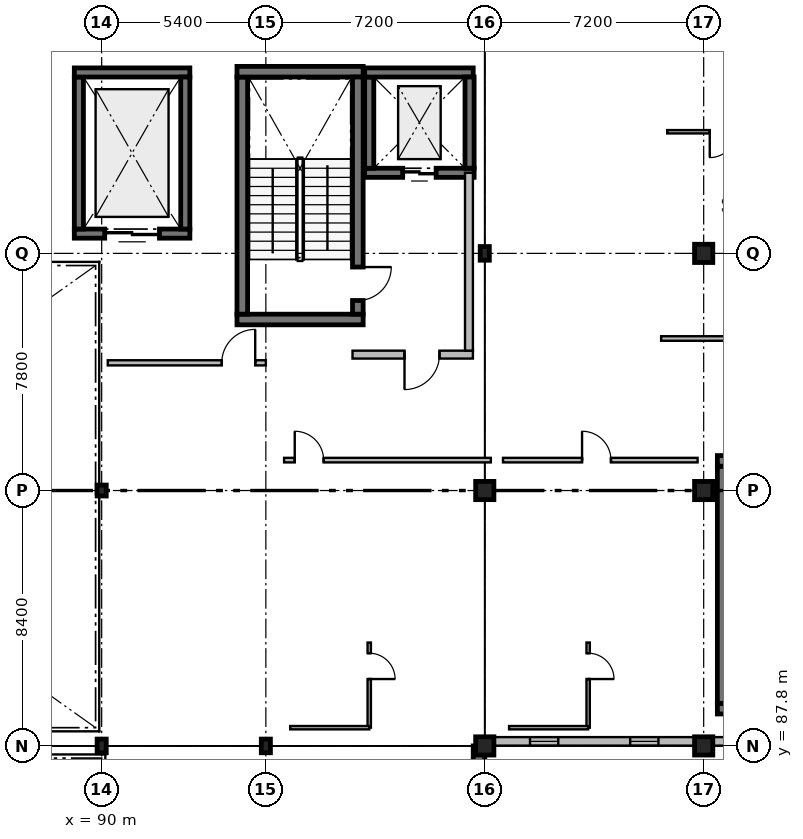
"""IFC4 building model, lengths in metres.
Left out: names, types, materials, properties, quantities, classifications, styles, units other than length and angle.
Written with IfcOpenShell. Run it as: python <this file> out.ifc"""

import sys

from ifc_helpers import new_model, si_unit, direction, frame, frame_2d, origin, origin_2d, place, context, subcontext, project, spatial, rectangle, i_section, extrude, element, fill, save


model = new_model("IFC4")
c1 = context("Model", 3, precision=1e-05, world=origin(), true_north=direction((0.0, 1.0)))
c2 = subcontext(c1, "Body", "Model", "MODEL_VIEW")
j1 = project(units=[si_unit("LENGTHUNIT", "METRE"), si_unit("PLANEANGLEUNIT", "RADIAN")], contexts=[c1])
p1 = place(None, origin())
s1 = spatial("IfcSite", under=j1, at=p1, CompositionType="ELEMENT")
p2 = place(p1, origin())
s2 = spatial("IfcBuilding", under=s1, at=p2, CompositionType="ELEMENT")
p3 = place(p2, frame((0.0, 0.0, 4.8)))
s3 = spatial("IfcBuildingStorey", under=s2, at=p3, CompositionType="ELEMENT", Elevation=4.8)
p4 = place(p3, frame((90.0, 87.8, 0.0), z_axis=(0.0, 0.0, 1.0), x_axis=(1.0, 0.0, 0.0)))
e1 = element("IfcColumn", 1, at=p4, inside=s3, PredefinedType="COLUMN", context=c2, shape_type="SweptSolid", body=[
    extrude(i_section(OverallWidth=0.3, OverallDepth=0.45, WebThickness=0.014, FlangeThickness=0.026, FilletRadius=0.027, at=origin_2d()), origin(), (0.0, 0.0, 1.0), 4.2),
])
p5 = place(p3, frame((90.0, 96.2, 0.0), z_axis=(0.0, 0.0, 1.0), x_axis=(1.0, 0.0, 0.0)))
e2 = element("IfcColumn", 2, at=p5, inside=s3, PredefinedType="COLUMN", context=c2, shape_type="SweptSolid", body=[
    extrude(i_section(OverallWidth=0.3, OverallDepth=0.36, WebThickness=0.012, FlangeThickness=0.022, FilletRadius=0.027, at=origin_2d()), origin(), (0.0, 0.0, 1.0), 4.2),
])
p6 = place(p3, frame((95.4, 87.8, 0.0), z_axis=(0.0, 0.0, 1.0), x_axis=(1.0, 0.0, 0.0)))
e3 = element("IfcColumn", 3, at=p6, inside=s3, PredefinedType="COLUMN", context=c2, shape_type="SweptSolid", body=[
    extrude(i_section(OverallWidth=0.3, OverallDepth=0.45, WebThickness=0.014, FlangeThickness=0.026, FilletRadius=0.027, at=origin_2d()), origin(), (0.0, 0.0, 1.0), 4.2),
])
for number, where, z_axis, x_axis in (
    (4, (102.6, 87.8, 0.0), (0.0, 0.0, 1.0), (1.0, 0.0, 0.0)),
    (5, (102.6, 96.2, 0.0), (0.0, 0.0, 1.0), (1.0, 0.0, 0.0)),
):
    element("IfcColumn", number, at=place(p3, frame(where, z_axis=z_axis, x_axis=x_axis)), inside=s3, PredefinedType="COLUMN", context=c2, shape_type="SweptSolid", body=[
        extrude(rectangle(XDim=0.6, YDim=0.6, at=origin_2d()), origin(), (0.0, 0.0, 1.0), 4.2),
    ])
p7 = place(p3, frame((102.6, 104.0, 0.0), z_axis=(0.0, 0.0, 1.0), x_axis=(1.0, 0.0, 0.0)))
e6 = element("IfcColumn", 6, at=p7, inside=s3, PredefinedType="COLUMN", context=c2, shape_type="SweptSolid", body=[
    extrude(i_section(OverallWidth=0.3, OverallDepth=0.45, WebThickness=0.014, FlangeThickness=0.026, FilletRadius=0.027, at=origin_2d()), origin(), (0.0, 0.0, 1.0), 4.2),
])
for number, where, z_axis, x_axis in (
    (7, (109.8, 87.8, 0.0), (0.0, 0.0, 1.0), (1.0, 0.0, 0.0)),
    (8, (109.8, 96.2, 0.0), (0.0, 0.0, 1.0), (1.0, 0.0, 0.0)),
    (9, (109.8, 104.0, 0.0), (0.0, 0.0, 1.0), (1.0, 0.0, 0.0)),
):
    element("IfcColumn", number, at=place(p3, frame(where, z_axis=z_axis, x_axis=x_axis)), inside=s3, PredefinedType="COLUMN", context=c2, shape_type="SweptSolid", body=[
        extrude(rectangle(XDim=0.6, YDim=0.6, at=origin_2d()), origin(), (0.0, 0.0, 1.0), 4.2),
    ])
p8 = place(p3, frame((98.6, 101.825, 0.0), z_axis=(0.0, 0.0, 1.0), x_axis=(-1.0, 0.0, 0.0)))
e10 = element("IfcWall", 10, at=p8, inside=s3, PredefinedType="SOLIDWALL", context=c2, shape_type="SweptSolid", body=[
    extrude(rectangle(XDim=4.15, YDim=0.35, at=frame_2d((2.075, 0.0))), origin(), (0.0, 0.0, 1.0), 4.2),
])
p9 = place(p3, frame((94.625, 102.0, 0.0), z_axis=(0.0, 0.0, 1.0), x_axis=(0.0, 1.0, 0.0)))
e11 = element("IfcWall", 11, at=p9, inside=s3, PredefinedType="SOLIDWALL", context=c2, shape_type="SweptSolid", body=[
    extrude(rectangle(XDim=7.8, YDim=0.35, at=frame_2d((3.9, 0.0))), origin(), (0.0, 0.0, 1.0), 4.2),
])
p10 = place(p3, frame((94.45, 109.975, 0.0), z_axis=(0.0, 0.0, 1.0), x_axis=(1.0, 0.0, 0.0)))
e12 = element("IfcWall", 12, at=p10, inside=s3, PredefinedType="SOLIDWALL", context=c2, shape_type="SweptSolid", body=[
    extrude(rectangle(XDim=4.15, YDim=0.35, at=frame_2d((2.075, 0.0))), origin(), (0.0, 0.0, 1.0), 4.2),
])
p11 = place(p3, frame((98.425, 109.8, 0.0), z_axis=(0.0, 0.0, 1.0), x_axis=(0.0, -1.0, 0.0)))
e13 = element("IfcWall", 13, at=p11, inside=s3, PredefinedType="SOLIDWALL", context=c2, shape_type="SweptSolid", body=[
    extrude(rectangle(XDim=7.8, YDim=0.35, at=frame_2d((3.9, 0.0))), origin(), (0.0, 0.0, 1.0), 4.2),
])
p12 = place(p11, frame((6.25, 0.0, 0.0)))
e14 = element("IfcOpeningElement", 14, at=p12, cuts=e13, PredefinedType="OPENING", context=c2, shape_type="SweptSolid", body=[
    extrude(rectangle(XDim=1.1, YDim=2.15, at=frame_2d((0.55, 1.075))), frame((0.0, 0.195, 0.0), z_axis=(0.0, -1.0, 0.0), x_axis=(1.0, 0.0, 0.0)), (0.0, 0.0, 1.0), 0.39),
])
p13 = place(p3, frame((102.25, 106.65, 0.0), z_axis=(0.0, 0.0, 1.0), x_axis=(-1.0, 0.0, 0.0)))
e15 = element("IfcWall", 15, at=p13, inside=s3, PredefinedType="SOLIDWALL", context=c2, shape_type="SweptSolid", body=[
    extrude(rectangle(XDim=3.6, YDim=0.3, at=frame_2d((1.8, 0.0))), origin(), (0.0, 0.0, 1.0), 4.2),
])
p14 = place(p13, frame((1.25, 0.0, 0.0)))
e16 = element("IfcOpeningElement", 16, at=p14, cuts=e15, PredefinedType="OPENING", context=c2, shape_type="SweptSolid", body=[
    extrude(rectangle(XDim=1.1, YDim=2.1, at=frame_2d((0.55, 1.05))), frame((0.0, 0.17, 0.0), z_axis=(0.0, -1.0, 0.0), x_axis=(1.0, 0.0, 0.0)), (0.0, 0.0, 1.0), 0.34),
])
p15 = place(p3, frame((98.8, 106.8, 0.0), z_axis=(0.0, 0.0, 1.0), x_axis=(0.0, 1.0, 0.0)))
e17 = element("IfcWall", 17, at=p15, inside=s3, PredefinedType="SOLIDWALL", context=c2, shape_type="SweptSolid", body=[
    extrude(rectangle(XDim=3.0, YDim=0.3, at=frame_2d((1.5, 0.0))), origin(), (0.0, 0.0, 1.0), 4.2),
])
p16 = place(p3, frame((98.65, 109.95, 0.0), z_axis=(0.0, 0.0, 1.0), x_axis=(1.0, 0.0, 0.0)))
e18 = element("IfcWall", 18, at=p16, inside=s3, PredefinedType="SOLIDWALL", context=c2, shape_type="SweptSolid", body=[
    extrude(rectangle(XDim=3.57, YDim=0.3, at=frame_2d((1.785, 0.0))), origin(), (0.0, 0.0, 1.0), 4.2),
])
p17 = place(p3, frame((102.1, 109.8, 0.0), z_axis=(0.0, 0.0, 1.0), x_axis=(0.0, -1.0, 0.0)))
e19 = element("IfcWall", 19, at=p17, inside=s3, PredefinedType="SOLIDWALL", context=c2, shape_type="SweptSolid", body=[
    extrude(rectangle(XDim=3.0, YDim=0.3, at=frame_2d((1.5, 0.0))), origin(), (0.0, 0.0, 1.0), 4.2),
])
p18 = place(p3, frame((102.21, 100.67, 0.0), z_axis=(0.0, 0.0, 1.0), x_axis=(-1.0, 0.0, 0.0)))
e20 = element("IfcWall", 20, at=p18, inside=s3, PredefinedType="SOLIDWALL", context=c2, shape_type="SweptSolid", body=[
    extrude(rectangle(XDim=3.96, YDim=0.26, at=frame_2d((1.98, 0.0))), origin(), (0.0, 0.0, 1.0), 3.94),
])
p19 = place(p18, frame((1.1, 0.0, 0.0)))
e21 = element("IfcOpeningElement", 21, at=p19, cuts=e20, PredefinedType="OPENING", context=c2, shape_type="SweptSolid", body=[
    extrude(rectangle(XDim=1.15, YDim=2.2, at=frame_2d((0.575, 1.1))), frame((0.0, 0.15, 0.0), z_axis=(0.0, -1.0, 0.0), x_axis=(1.0, 0.0, 0.0)), (0.0, 0.0, 1.0), 0.3),
])
p20 = place(p3, frame((102.08, 106.65, 0.0), z_axis=(0.0, 0.0, 1.0), x_axis=(0.0, -1.0, 0.0)))
e22 = element("IfcWall", 22, at=p20, inside=s3, PredefinedType="SOLIDWALL", context=c2, shape_type="SweptSolid", body=[
    extrude(rectangle(XDim=5.85, YDim=0.26, at=frame_2d((2.925, 0.0))), origin(), (0.0, 0.0, 1.0), 3.94),
])
p21 = place(p3, frame((114.4, 89.025, 0.0), z_axis=(0.0, 0.0, 1.0), x_axis=(-1.0, 0.0, 0.0)))
e23 = element("IfcWall", 23, at=p21, inside=s3, PredefinedType="SOLIDWALL", context=c2, shape_type="SweptSolid", body=[
    extrude(rectangle(XDim=4.15, YDim=0.35, at=frame_2d((2.075, 0.0))), origin(), (0.0, 0.0, 1.0), 4.2),
])
p22 = place(p3, frame((110.425, 89.2, 0.0), z_axis=(0.0, 0.0, 1.0), x_axis=(0.0, 1.0, 0.0)))
e24 = element("IfcWall", 24, at=p22, inside=s3, PredefinedType="SOLIDWALL", context=c2, shape_type="SweptSolid", body=[
    extrude(rectangle(XDim=7.8, YDim=0.35, at=frame_2d((3.9, 0.0))), origin(), (0.0, 0.0, 1.0), 4.2),
])
p23 = place(p3, frame((110.25, 97.175, 0.0), z_axis=(0.0, 0.0, 1.0), x_axis=(1.0, 0.0, 0.0)))
e25 = element("IfcWall", 25, at=p23, inside=s3, PredefinedType="SOLIDWALL", context=c2, shape_type="SweptSolid", body=[
    extrude(rectangle(XDim=4.15, YDim=0.35, at=frame_2d((2.075, 0.0))), origin(), (0.0, 0.0, 1.0), 4.2),
])
p24 = place(p23, frame((1.525, 0.0, 0.0)))
e26 = element("IfcOpeningElement", 26, at=p24, cuts=e25, PredefinedType="OPENING", context=c2, shape_type="SweptSolid", body=[
    extrude(rectangle(XDim=1.1, YDim=2.15, at=frame_2d((0.55, 1.075))), frame((0.0, 0.195, 0.0), z_axis=(0.0, -1.0, 0.0), x_axis=(1.0, 0.0, 0.0)), (0.0, 0.0, 1.0), 0.39),
])
p25 = place(p3, frame((92.9, 104.65, 0.0), z_axis=(0.0, 0.0, 1.0), x_axis=(-1.0, 0.0, 0.0)))
e27 = element("IfcWall", 27, at=p25, inside=s3, PredefinedType="SOLIDWALL", context=c2, shape_type="SweptSolid", body=[
    extrude(rectangle(XDim=3.8, YDim=0.3, at=frame_2d((1.9, 0.0))), origin(), (0.0, 0.0, 1.0), 4.2),
])
p26 = place(p25, frame((1.0, 0.0, 0.0)))
e28 = element("IfcOpeningElement", 28, at=p26, cuts=e27, PredefinedType="OPENING", context=c2, shape_type="SweptSolid", body=[
    extrude(rectangle(XDim=1.8, YDim=2.4, at=frame_2d((0.9, 1.2))), frame((0.0, 0.17, 0.0), z_axis=(0.0, -1.0, 0.0), x_axis=(1.0, 0.0, 0.0)), (0.0, 0.0, 1.0), 0.34),
])
p27 = place(p3, frame((89.25, 104.8, 0.0), z_axis=(0.0, 0.0, 1.0), x_axis=(0.0, 1.0, 0.0)))
e29 = element("IfcWall", 29, at=p27, inside=s3, PredefinedType="SOLIDWALL", context=c2, shape_type="SweptSolid", body=[
    extrude(rectangle(XDim=5.0, YDim=0.3, at=frame_2d((2.5, 0.0))), origin(), (0.0, 0.0, 1.0), 4.2),
])
p28 = place(p3, frame((89.1, 109.95, 0.0), z_axis=(0.0, 0.0, 1.0), x_axis=(1.0, 0.0, 0.0)))
e30 = element("IfcWall", 30, at=p28, inside=s3, PredefinedType="SOLIDWALL", context=c2, shape_type="SweptSolid", body=[
    extrude(rectangle(XDim=3.8, YDim=0.3, at=frame_2d((1.9, 0.0))), origin(), (0.0, 0.0, 1.0), 4.2),
])
p29 = place(p3, frame((92.75, 109.8, 0.0), z_axis=(0.0, 0.0, 1.0), x_axis=(0.0, -1.0, 0.0)))
e31 = element("IfcWall", 31, at=p29, inside=s3, PredefinedType="SOLIDWALL", context=c2, shape_type="SweptSolid", body=[
    extrude(rectangle(XDim=5.0, YDim=0.3, at=frame_2d((2.5, 0.0))), origin(), (0.0, 0.0, 1.0), 4.2),
])
p30 = place(p3, frame((102.41, 87.8, 0.0), z_axis=(0.0, 0.0, 1.0), x_axis=(0.0, -1.0, 0.0)))
e32 = element("IfcWall", 32, at=p30, inside=s3, PredefinedType="SOLIDWALL", context=c2, shape_type="SweptSolid", body=[
    extrude(rectangle(XDim=36.0, YDim=0.38, at=frame_2d((18.0, 0.0))), origin(), (0.0, 0.0, 1.0), 3.94),
])
p31 = place(p3, frame((102.905, 87.95, 0.0), z_axis=(0.0, 0.0, 1.0), x_axis=(1.0, 0.0, 0.0)))
e33 = element("IfcWall", 33, at=p31, inside=s3, PredefinedType="SOLIDWALL", context=c2, shape_type="SweptSolid", body=[
    extrude(rectangle(XDim=6.59, YDim=0.28, at=frame_2d((3.295, 0.0))), origin(), (0.0, 0.0, 1.0), 3.273),
])
p32 = place(p31, frame((1.183, 0.0, 0.95)))
e34 = element("IfcOpeningElement", 34, at=p32, cuts=e33, PredefinedType="OPENING", context=c2, shape_type="SweptSolid", body=[
    extrude(rectangle(XDim=0.93, YDim=1.8, at=frame_2d((0.465, 0.9))), frame((0.0, 0.16, 0.0), z_axis=(0.0, -1.0, 0.0), x_axis=(1.0, 0.0, 0.0)), (0.0, 0.0, 1.0), 0.32),
])
p33 = place(p31, frame((4.478, 0.0, 0.95)))
e35 = element("IfcOpeningElement", 35, at=p33, cuts=e33, PredefinedType="OPENING", context=c2, shape_type="SweptSolid", body=[
    extrude(rectangle(XDim=0.93, YDim=1.8, at=frame_2d((0.465, 0.9))), frame((0.0, 0.16, 0.0), z_axis=(0.0, -1.0, 0.0), x_axis=(1.0, 0.0, 0.0)), (0.0, 0.0, 1.0), 0.32),
])
p34 = place(p3, frame((110.105, 87.95, 0.0), z_axis=(0.0, 0.0, 1.0), x_axis=(1.0, 0.0, 0.0)))
e36 = element("IfcWall", 36, at=p34, inside=s3, PredefinedType="SOLIDWALL", context=c2, shape_type="SweptSolid", body=[
    extrude(rectangle(XDim=6.59, YDim=0.28, at=frame_2d((3.295, 0.0))), origin(), (0.0, 0.0, 1.0), 3.273),
])
p35 = place(p34, frame((1.153, 0.0, 0.95)))
e37 = element("IfcOpeningElement", 37, at=p35, cuts=e36, PredefinedType="OPENING", context=c2, shape_type="SweptSolid", body=[
    extrude(rectangle(XDim=0.99, YDim=1.8, at=frame_2d((0.495, 0.9))), frame((0.0, 0.16, 0.0), z_axis=(0.0, -1.0, 0.0), x_axis=(1.0, 0.0, 0.0)), (0.0, 0.0, 1.0), 0.32),
])
p36 = place(p34, frame((4.448, 0.0, 0.95)))
e38 = element("IfcOpeningElement", 38, at=p36, cuts=e36, PredefinedType="OPENING", context=c2, shape_type="SweptSolid", body=[
    extrude(rectangle(XDim=0.99, YDim=1.8, at=frame_2d((0.495, 0.9))), frame((0.0, 0.16, 0.0), z_axis=(0.0, -1.0, 0.0), x_axis=(1.0, 0.0, 0.0)), (0.0, 0.0, 1.0), 0.32),
])
p37 = place(p3, frame((98.8, 91.2, 0.0), z_axis=(0.0, 0.0, 1.0), x_axis=(0.0, -1.0, 0.0)))
e39 = element("IfcWall", 39, at=p37, inside=s3, PredefinedType="PARTITIONING", context=c2, shape_type="SweptSolid", body=[
    extrude(rectangle(XDim=2.8, YDim=0.11, at=frame_2d((1.4, 0.0))), origin(), (0.0, 0.0, 1.0), 3.94),
])
p38 = place(p37, frame((0.35, 0.0, 0.0)))
e40 = element("IfcOpeningElement", 40, at=p38, cuts=e39, PredefinedType="OPENING", context=c2, shape_type="SweptSolid", body=[
    extrude(rectangle(XDim=0.85, YDim=2.1, at=frame_2d((0.425, 1.05))), frame((0.0, 0.075, 0.0), z_axis=(0.0, -1.0, 0.0), x_axis=(1.0, 0.0, 0.0)), (0.0, 0.0, 1.0), 0.15),
])
p39 = place(p3, frame((98.8, 88.4, 0.0), z_axis=(0.0, 0.0, 1.0), x_axis=(-1.0, 0.0, 0.0)))
e41 = element("IfcWall", 41, at=p39, inside=s3, PredefinedType="PARTITIONING", context=c2, shape_type="SweptSolid", body=[
    extrude(rectangle(XDim=2.6, YDim=0.11, at=frame_2d((1.3, 0.0))), origin(), (0.0, 0.0, 1.0), 3.94),
])
p40 = place(p3, frame((96.0, 97.2, 0.0), z_axis=(0.0, 0.0, 1.0), x_axis=(1.0, 0.0, 0.0)))
e42 = element("IfcWall", 42, at=p40, inside=s3, PredefinedType="PARTITIONING", context=c2, shape_type="SweptSolid", body=[
    extrude(rectangle(XDim=6.8, YDim=0.15, at=frame_2d((3.4, 0.0))), origin(), (0.0, 0.0, 1.0), 3.94),
])
p41 = place(p40, frame((0.35, 0.0, 0.0)))
e43 = element("IfcOpeningElement", 43, at=p41, cuts=e42, PredefinedType="OPENING", context=c2, shape_type="SweptSolid", body=[
    extrude(rectangle(XDim=0.95, YDim=2.2, at=frame_2d((0.475, 1.1))), frame((0.0, 0.095, 0.0), z_axis=(0.0, -1.0, 0.0), x_axis=(1.0, 0.0, 0.0)), (0.0, 0.0, 1.0), 0.19),
])
p42 = place(p3, frame((106.0, 91.2, 0.0), z_axis=(0.0, 0.0, 1.0), x_axis=(0.0, -1.0, 0.0)))
e44 = element("IfcWall", 44, at=p42, inside=s3, PredefinedType="PARTITIONING", context=c2, shape_type="SweptSolid", body=[
    extrude(rectangle(XDim=2.8, YDim=0.11, at=frame_2d((1.4, 0.0))), origin(), (0.0, 0.0, 1.0), 3.94),
])
p43 = place(p42, frame((0.35, 0.0, 0.0)))
e45 = element("IfcOpeningElement", 45, at=p43, cuts=e44, PredefinedType="OPENING", context=c2, shape_type="SweptSolid", body=[
    extrude(rectangle(XDim=0.85, YDim=2.1, at=frame_2d((0.425, 1.05))), frame((0.0, 0.075, 0.0), z_axis=(0.0, -1.0, 0.0), x_axis=(1.0, 0.0, 0.0)), (0.0, 0.0, 1.0), 0.15),
])
p44 = place(p3, frame((106.0, 88.4, 0.0), z_axis=(0.0, 0.0, 1.0), x_axis=(-1.0, 0.0, 0.0)))
e46 = element("IfcWall", 46, at=p44, inside=s3, PredefinedType="PARTITIONING", context=c2, shape_type="SweptSolid", body=[
    extrude(rectangle(XDim=2.6, YDim=0.11, at=frame_2d((1.3, 0.0))), origin(), (0.0, 0.0, 1.0), 3.94),
])
p45 = place(p3, frame((103.2, 97.2, 0.0), z_axis=(0.0, 0.0, 1.0), x_axis=(1.0, 0.0, 0.0)))
e47 = element("IfcWall", 47, at=p45, inside=s3, PredefinedType="PARTITIONING", context=c2, shape_type="SweptSolid", body=[
    extrude(rectangle(XDim=6.4, YDim=0.15, at=frame_2d((3.2, 0.0))), origin(), (0.0, 0.0, 1.0), 3.94),
])
p46 = place(p45, frame((2.6, 0.0, 0.0)))
e48 = element("IfcOpeningElement", 48, at=p46, cuts=e47, PredefinedType="OPENING", context=c2, shape_type="SweptSolid", body=[
    extrude(rectangle(XDim=0.95, YDim=2.2, at=frame_2d((0.475, 1.1))), frame((0.0, 0.095, 0.0), z_axis=(0.0, -1.0, 0.0), x_axis=(1.0, 0.0, 0.0)), (0.0, 0.0, 1.0), 0.19),
])
p47 = place(p3, frame((111.2, 108.0, 0.0), z_axis=(0.0, 0.0, 1.0), x_axis=(-1.0, 0.0, 0.0)))
e49 = element("IfcWall", 49, at=p47, inside=s3, PredefinedType="PARTITIONING", context=c2, shape_type="SweptSolid", body=[
    extrude(rectangle(XDim=2.6, YDim=0.11, at=frame_2d((1.3, 0.0))), origin(), (0.0, 0.0, 1.0), 3.94),
])
p48 = place(p47, frame((0.35, 0.0, 0.0)))
e50 = element("IfcOpeningElement", 50, at=p48, cuts=e49, PredefinedType="OPENING", context=c2, shape_type="SweptSolid", body=[
    extrude(rectangle(XDim=0.85, YDim=2.1, at=frame_2d((0.425, 1.05))), frame((0.0, 0.075, 0.0), z_axis=(0.0, -1.0, 0.0), x_axis=(1.0, 0.0, 0.0)), (0.0, 0.0, 1.0), 0.15),
])
p49 = place(p3, frame((117.2, 101.2, 0.0), z_axis=(0.0, 0.0, 1.0), x_axis=(-1.0, 0.0, 0.0)))
e51 = element("IfcWall", 51, at=p49, inside=s3, PredefinedType="PARTITIONING", context=c2, shape_type="SweptSolid", body=[
    extrude(rectangle(XDim=8.8, YDim=0.15, at=frame_2d((4.4, 0.0))), origin(), (0.0, 0.0, 1.0), 3.94),
])
p50 = place(p49, frame((3.309, 0.0, 0.0)))
e52 = element("IfcOpeningElement", 52, at=p50, cuts=e51, PredefinedType="OPENING", context=c2, shape_type="SweptSolid", body=[
    extrude(rectangle(XDim=0.95, YDim=2.2, at=frame_2d((0.475, 1.1))), frame((0.0, 0.095, 0.0), z_axis=(0.0, -1.0, 0.0), x_axis=(1.0, 0.0, 0.0)), (0.0, 0.0, 1.0), 0.19),
])
p51 = place(p3, frame((90.2, 100.4, 0.0), z_axis=(0.0, 0.0, 1.0), x_axis=(1.0, 0.0, 0.0)))
e53 = element("IfcWall", 53, at=p51, inside=s3, PredefinedType="PARTITIONING", context=c2, shape_type="SweptSolid", body=[
    extrude(rectangle(XDim=5.2, YDim=0.17, at=frame_2d((2.6, 0.0))), origin(), (0.0, 0.0, 1.0), 3.94),
])
p52 = place(p51, frame((3.75, 0.0, 0.0)))
e54 = element("IfcOpeningElement", 54, at=p52, cuts=e53, PredefinedType="OPENING", context=c2, shape_type="SweptSolid", body=[
    extrude(rectangle(XDim=1.1, YDim=2.1, at=frame_2d((0.55, 1.05))), frame((0.0, 0.105, 0.0), z_axis=(0.0, -1.0, 0.0), x_axis=(1.0, 0.0, 0.0)), (0.0, 0.0, 1.0), 0.21),
])
p53 = place(p12, origin())
e55 = element("IfcDoor", 55, at=p53, inside=s3, OperationType="SINGLE_SWING_LEFT", PredefinedType="DOOR", context=c2, shape_type="SweptSolid", body=[
    extrude(rectangle(XDim=1.1, YDim=2.15, at=frame_2d((0.55, 1.075))), frame((0.0, 0.025, 0.0), z_axis=(0.0, -1.0, 0.0), x_axis=(1.0, 0.0, 0.0)), (0.0, 0.0, 1.0), 0.05),
])
fill(e14, e55)
p54 = place(p14, origin())
e56 = element("IfcDoor", 56, at=p54, inside=s3, OperationType="DOUBLE_DOOR_SLIDING", PredefinedType="DOOR", context=c2, shape_type="SweptSolid", body=[
    extrude(rectangle(XDim=1.1, YDim=2.1, at=frame_2d((0.55, 1.05))), frame((0.0, 0.025, 0.0), z_axis=(0.0, -1.0, 0.0), x_axis=(1.0, 0.0, 0.0)), (0.0, 0.0, 1.0), 0.05),
])
fill(e16, e56)
p55 = place(p19, origin())
e57 = element("IfcDoor", 57, at=p55, inside=s3, OperationType="SINGLE_SWING_RIGHT", PredefinedType="DOOR", context=c2, shape_type="SweptSolid", body=[
    extrude(rectangle(XDim=1.15, YDim=2.2, at=frame_2d((0.575, 1.1))), frame((0.0, 0.025, 0.0), z_axis=(0.0, -1.0, 0.0), x_axis=(1.0, 0.0, 0.0)), (0.0, 0.0, 1.0), 0.05),
])
fill(e21, e57)
p56 = place(p26, origin())
e58 = element("IfcDoor", 58, at=p56, inside=s3, OperationType="DOUBLE_DOOR_SLIDING", PredefinedType="DOOR", context=c2, shape_type="SweptSolid", body=[
    extrude(rectangle(XDim=1.8, YDim=2.4, at=frame_2d((0.9, 1.2))), frame((0.0, 0.025, 0.0), z_axis=(0.0, -1.0, 0.0), x_axis=(1.0, 0.0, 0.0)), (0.0, 0.0, 1.0), 0.05),
])
fill(e28, e58)
p57 = place(p32, origin())
e59 = element("IfcWindow", 59, at=p57, inside=s3, PartitioningType="SINGLE_PANEL", PredefinedType="WINDOW", context=c2, shape_type="SweptSolid", body=[
    extrude(rectangle(XDim=0.93, YDim=1.8, at=frame_2d((0.465, 0.9))), frame((0.0, 0.03, 0.0), z_axis=(0.0, -1.0, 0.0), x_axis=(1.0, 0.0, 0.0)), (0.0, 0.0, 1.0), 0.06),
])
fill(e34, e59)
p58 = place(p33, origin())
e60 = element("IfcWindow", 60, at=p58, inside=s3, PartitioningType="SINGLE_PANEL", PredefinedType="WINDOW", context=c2, shape_type="SweptSolid", body=[
    extrude(rectangle(XDim=0.93, YDim=1.8, at=frame_2d((0.465, 0.9))), frame((0.0, 0.03, 0.0), z_axis=(0.0, -1.0, 0.0), x_axis=(1.0, 0.0, 0.0)), (0.0, 0.0, 1.0), 0.06),
])
fill(e35, e60)
p59 = place(p38, origin())
e61 = element("IfcDoor", 61, at=p59, inside=s3, OperationType="SINGLE_SWING_RIGHT", PredefinedType="DOOR", context=c2, shape_type="SweptSolid", body=[
    extrude(rectangle(XDim=0.85, YDim=2.1, at=frame_2d((0.425, 1.05))), frame((0.0, 0.025, 0.0), z_axis=(0.0, -1.0, 0.0), x_axis=(1.0, 0.0, 0.0)), (0.0, 0.0, 1.0), 0.05),
])
fill(e40, e61)
p60 = place(p41, origin())
e62 = element("IfcDoor", 62, at=p60, inside=s3, OperationType="SINGLE_SWING_LEFT", PredefinedType="DOOR", context=c2, shape_type="SweptSolid", body=[
    extrude(rectangle(XDim=0.95, YDim=2.2, at=frame_2d((0.475, 1.1))), frame((0.0, 0.025, 0.0), z_axis=(0.0, -1.0, 0.0), x_axis=(1.0, 0.0, 0.0)), (0.0, 0.0, 1.0), 0.05),
])
fill(e43, e62)
p61 = place(p43, origin())
e63 = element("IfcDoor", 63, at=p61, inside=s3, OperationType="SINGLE_SWING_RIGHT", PredefinedType="DOOR", context=c2, shape_type="SweptSolid", body=[
    extrude(rectangle(XDim=0.85, YDim=2.1, at=frame_2d((0.425, 1.05))), frame((0.0, 0.025, 0.0), z_axis=(0.0, -1.0, 0.0), x_axis=(1.0, 0.0, 0.0)), (0.0, 0.0, 1.0), 0.05),
])
fill(e45, e63)
p62 = place(p46, origin())
e64 = element("IfcDoor", 64, at=p62, inside=s3, OperationType="SINGLE_SWING_LEFT", PredefinedType="DOOR", context=c2, shape_type="SweptSolid", body=[
    extrude(rectangle(XDim=0.95, YDim=2.2, at=frame_2d((0.475, 1.1))), frame((0.0, 0.025, 0.0), z_axis=(0.0, -1.0, 0.0), x_axis=(1.0, 0.0, 0.0)), (0.0, 0.0, 1.0), 0.05),
])
fill(e48, e64)
p63 = place(p48, origin())
e65 = element("IfcDoor", 65, at=p63, inside=s3, OperationType="SINGLE_SWING_RIGHT", PredefinedType="DOOR", context=c2, shape_type="SweptSolid", body=[
    extrude(rectangle(XDim=0.85, YDim=2.1, at=frame_2d((0.425, 1.05))), frame((0.0, 0.025, 0.0), z_axis=(0.0, -1.0, 0.0), x_axis=(1.0, 0.0, 0.0)), (0.0, 0.0, 1.0), 0.05),
])
fill(e50, e65)
p64 = place(p52, origin())
e66 = element("IfcDoor", 66, at=p64, inside=s3, OperationType="SINGLE_SWING_RIGHT", PredefinedType="DOOR", context=c2, shape_type="SweptSolid", body=[
    extrude(rectangle(XDim=1.1, YDim=2.1, at=frame_2d((0.55, 1.05))), frame((0.0, 0.025, 0.0), z_axis=(0.0, -1.0, 0.0), x_axis=(1.0, 0.0, 0.0)), (0.0, 0.0, 1.0), 0.05),
])
fill(e54, e66)
save(model, sys.argv[1])
